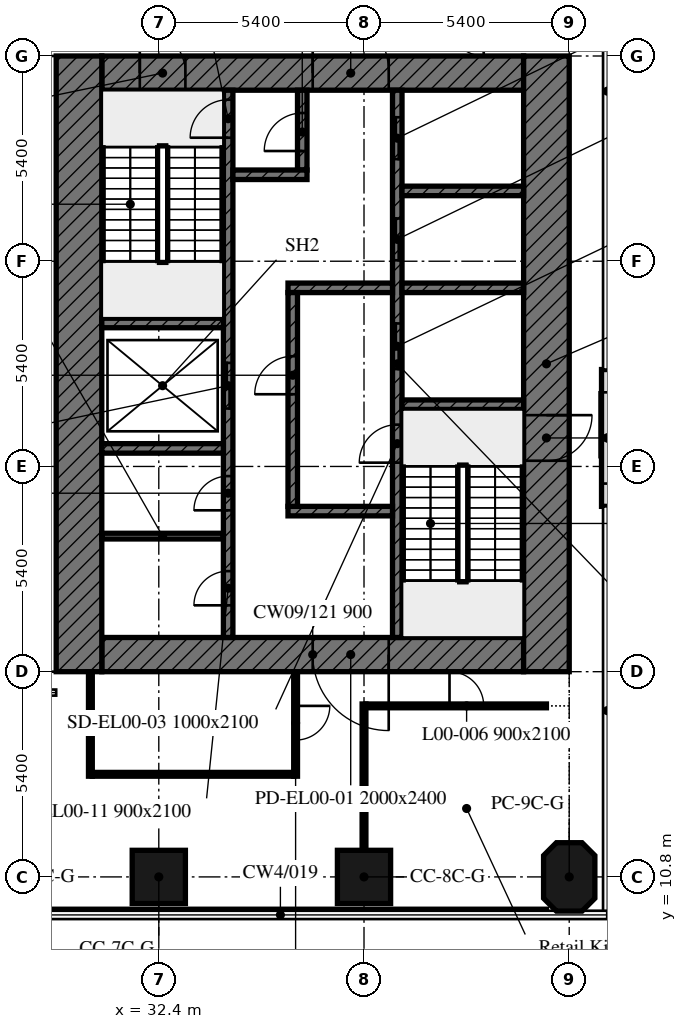
"""IFC4 building model, lengths in metres.
Left out: names, types, materials, properties, quantities, classifications, styles, units other than length and angle.
Written with IfcOpenShell. Run it as: python <this file> out.ifc"""

import sys

from ifc_helpers import new_model, si_unit, direction, frame, frame_2d, origin, origin_2d, place, context, subcontext, project, spatial, polyline, rectangle, outline, extrude, element, fill, save


model = new_model("IFC4")
c1 = context("Model", 3, precision=1e-05, world=origin(), true_north=direction((0.0, 1.0)))
c2 = subcontext(c1, "Body", "Model", "MODEL_VIEW")
j1 = project(units=[si_unit("LENGTHUNIT", "METRE"), si_unit("PLANEANGLEUNIT", "RADIAN")], contexts=[c1])
p1 = place(None, origin())
s1 = spatial("IfcSite", under=j1, at=p1, CompositionType="ELEMENT")
p2 = place(p1, origin())
s2 = spatial("IfcBuilding", under=s1, at=p2, CompositionType="ELEMENT")
p3 = place(p2, origin())
s3 = spatial("IfcBuildingStorey", under=s2, at=p3, CompositionType="ELEMENT", Elevation=0.0)
for number, where, z_axis, x_axis in (
    (1, (32.4, 10.8, 0.0), (0.0, 0.0, 1.0), (1.0, 0.0, 0.0)),
    (2, (37.8, 10.8, 0.0), (0.0, 0.0, 1.0), (1.0, 0.0, 0.0)),
):
    element("IfcColumn", number, at=place(p3, frame(where, z_axis=z_axis, x_axis=x_axis)), inside=s3, PredefinedType="COLUMN", context=c2, shape_type="SweptSolid", body=[
        extrude(rectangle(XDim=1.4, YDim=1.4, at=origin_2d()), origin(), (0.0, 0.0, 1.0), 8.0),
    ])
p4 = place(p3, frame((43.2, 10.8, 0.0), z_axis=(0.0, 0.0, 1.0), x_axis=(0.0, 1.0, 0.0)))
e3 = element("IfcColumn", 3, at=p4, inside=s3, PredefinedType="COLUMN", context=c2, shape_type="SweptSolid", body=[
    extrude(outline(polyline([(-0.562, -0.675), (0.562, -0.675), (0.9, -0.337), (0.9, 0.337), (0.562, 0.675), (-0.562, 0.675), (-0.9, 0.337), (-0.9, -0.337), (-0.562, -0.675)])), origin(), (0.0, 0.0, 1.0), 8.0),
])
p5 = place(p3, frame((44.2, 24.15, 0.0), z_axis=(0.0, 0.0, 1.0), x_axis=(0.0, -1.0, 0.0)))
e4 = element("IfcWall", 4, at=p5, inside=s3, PredefinedType="SOLIDWALL", context=c2, shape_type="SweptSolid", body=[
    extrude(rectangle(XDim=3.6, YDim=0.3, at=frame_2d((1.8, 0.0))), origin(), (0.0, 0.0, 1.0), 8.0),
])
p6 = place(p5, frame((0.6, 0.0, 0.0)))
e5 = element("IfcOpeningElement", 5, at=p6, cuts=e4, PredefinedType="OPENING", context=c2, shape_type="SweptSolid", body=[
    extrude(rectangle(XDim=2.4, YDim=2.7, at=frame_2d((1.2, 1.35))), frame((0.0, 0.16, 0.0), z_axis=(0.0, -1.0, 0.0), x_axis=(1.0, 0.0, 0.0)), (0.0, 0.0, 1.0), 0.32),
])
p7 = place(p3, frame((42.0, 16.65, 0.0), z_axis=(0.0, 0.0, 1.0), x_axis=(-1.0, 0.0, 0.0)))
e6 = element("IfcWall", 6, at=p7, inside=s3, PredefinedType="SOLIDWALL", context=c2, shape_type="SweptSolid", body=[
    extrude(rectangle(XDim=11.1, YDim=0.9, at=frame_2d((5.55, 0.0))), origin(), (0.0, 0.0, 1.0), 8.0),
])
p8 = place(p7, frame((3.55, 0.0, 0.0)))
e7 = element("IfcOpeningElement", 7, at=p8, cuts=e6, PredefinedType="OPENING", context=c2, shape_type="SweptSolid", body=[
    extrude(rectangle(XDim=2.0, YDim=2.4, at=frame_2d((1.0, 1.2))), frame((0.0, 0.45, 0.0), z_axis=(0.0, -1.0, 0.0), x_axis=(1.0, 0.0, 0.0)), (0.0, 0.0, 1.0), 0.9),
])
p9 = place(p3, frame((30.9, 31.95, 0.0), z_axis=(0.0, 0.0, 1.0), x_axis=(1.0, 0.0, 0.0)))
e8 = element("IfcWall", 8, at=p9, inside=s3, PredefinedType="SOLIDWALL", context=c2, shape_type="SweptSolid", body=[
    extrude(rectangle(XDim=11.1, YDim=0.9, at=frame_2d((5.55, 0.0))), origin(), (0.0, 0.0, 1.0), 8.0),
])
p10 = place(p9, frame((5.55, 0.0, 0.0)))
e9 = element("IfcOpeningElement", 9, at=p10, cuts=e8, PredefinedType="OPENING", context=c2, shape_type="SweptSolid", body=[
    extrude(rectangle(XDim=2.0, YDim=2.4, at=frame_2d((1.0, 1.2))), frame((0.0, 0.45, 0.0), z_axis=(0.0, -1.0, 0.0), x_axis=(1.0, 0.0, 0.0)), (0.0, 0.0, 1.0), 0.9),
])
p11 = place(p9, frame((1.0, 0.0, 0.0)))
e10 = element("IfcOpeningElement", 10, at=p11, cuts=e8, PredefinedType="OPENING", context=c2, shape_type="SweptSolid", body=[
    extrude(rectangle(XDim=1.2, YDim=2.1, at=frame_2d((0.6, 1.05))), frame((0.0, 0.45, 0.0), z_axis=(0.0, -1.0, 0.0), x_axis=(1.0, 0.0, 0.0)), (0.0, 0.0, 1.0), 0.9),
])
p12 = place(p3, frame((42.6, 32.4, 0.0), z_axis=(0.0, 0.0, 1.0), x_axis=(0.0, -1.0, 0.0)))
e11 = element("IfcWall", 11, at=p12, inside=s3, PredefinedType="SOLIDWALL", context=c2, shape_type="SweptSolid", body=[
    extrude(rectangle(XDim=16.2, YDim=1.2, at=frame_2d((8.1, 0.0))), origin(), (0.0, 0.0, 1.0), 8.0),
])
p13 = place(p12, frame((9.45, 0.0, 0.0)))
e12 = element("IfcOpeningElement", 12, at=p13, cuts=e11, PredefinedType="OPENING", context=c2, shape_type="SweptSolid", body=[
    extrude(rectangle(XDim=1.2, YDim=2.1, at=frame_2d((0.6, 1.05))), frame((0.0, 0.6, 0.0), z_axis=(0.0, -1.0, 0.0), x_axis=(1.0, 0.0, 0.0)), (0.0, 0.0, 1.0), 1.2),
])
p14 = place(p3, frame((30.3, 16.2, 0.0), z_axis=(0.0, 0.0, 1.0), x_axis=(0.0, 1.0, 0.0)))
e13 = element("IfcWall", 13, at=p14, inside=s3, PredefinedType="SOLIDWALL", context=c2, shape_type="SweptSolid", body=[
    extrude(rectangle(XDim=16.2, YDim=1.2, at=frame_2d((8.1, 0.0))), origin(), (0.0, 0.0, 1.0), 8.0),
])
p15 = place(p3, frame((38.675, 17.1, 0.0), z_axis=(0.0, 0.0, 1.0), x_axis=(0.0, 1.0, 0.0)))
e14 = element("IfcWall", 14, at=p15, inside=s3, PredefinedType="SOLIDWALL", context=c2, shape_type="SweptSolid", body=[
    extrude(rectangle(XDim=14.4, YDim=0.25, at=frame_2d((7.2, 0.0))), origin(), (0.0, 0.0, 1.0), 8.0),
])
p16 = place(p15, frame((4.6, 0.0, 0.0)))
e15 = element("IfcOpeningElement", 15, at=p16, cuts=e14, PredefinedType="OPENING", context=c2, shape_type="SweptSolid", body=[
    extrude(rectangle(XDim=1.0, YDim=2.1, at=frame_2d((0.5, 1.05))), frame((0.0, 0.125, 0.0), z_axis=(0.0, -1.0, 0.0), x_axis=(1.0, 0.0, 0.0)), (0.0, 0.0, 1.0), 0.25),
])
p17 = place(p15, frame((7.062, 0.0, 0.0)))
e16 = element("IfcOpeningElement", 16, at=p17, cuts=e14, PredefinedType="OPENING", context=c2, shape_type="SweptSolid", body=[
    extrude(rectangle(XDim=1.2, YDim=2.1, at=frame_2d((0.6, 1.05))), frame((0.0, 0.125, 0.0), z_axis=(0.0, -1.0, 0.0), x_axis=(1.0, 0.0, 0.0)), (0.0, 0.0, 1.0), 0.25),
])
p18 = place(p15, frame((9.925, 0.0, 0.0)))
e17 = element("IfcOpeningElement", 17, at=p18, cuts=e14, PredefinedType="OPENING", context=c2, shape_type="SweptSolid", body=[
    extrude(rectangle(XDim=1.1, YDim=2.1, at=frame_2d((0.55, 1.05))), frame((0.0, 0.125, 0.0), z_axis=(0.0, -1.0, 0.0), x_axis=(1.0, 0.0, 0.0)), (0.0, 0.0, 1.0), 0.25),
])
p19 = place(p15, frame((12.587, 0.0, 0.0)))
e18 = element("IfcOpeningElement", 18, at=p19, cuts=e14, PredefinedType="OPENING", context=c2, shape_type="SweptSolid", body=[
    extrude(rectangle(XDim=1.1, YDim=2.1, at=frame_2d((0.55, 1.05))), frame((0.0, 0.125, 0.0), z_axis=(0.0, -1.0, 0.0), x_axis=(1.0, 0.0, 0.0)), (0.0, 0.0, 1.0), 0.25),
])
p20 = place(p3, frame((34.225, 17.1, 0.0), z_axis=(0.0, 0.0, 1.0), x_axis=(0.0, 1.0, 0.0)))
e19 = element("IfcWall", 19, at=p20, inside=s3, PredefinedType="SOLIDWALL", context=c2, shape_type="SweptSolid", body=[
    extrude(rectangle(XDim=14.4, YDim=0.25, at=frame_2d((7.2, 0.0))), origin(), (0.0, 0.0, 1.0), 8.0),
])
p21 = place(p20, frame((13.15, 0.0, 0.0)))
e20 = element("IfcOpeningElement", 20, at=p21, cuts=e19, PredefinedType="OPENING", context=c2, shape_type="SweptSolid", body=[
    extrude(rectangle(XDim=1.0, YDim=2.1, at=frame_2d((0.5, 1.05))), frame((0.0, 0.125, 0.0), z_axis=(0.0, -1.0, 0.0), x_axis=(1.0, 0.0, 0.0)), (0.0, 0.0, 1.0), 0.25),
])
p22 = place(p20, frame((6.025, 0.0, 0.0)))
e21 = element("IfcOpeningElement", 21, at=p22, cuts=e19, PredefinedType="OPENING", context=c2, shape_type="SweptSolid", body=[
    extrude(rectangle(XDim=1.2, YDim=2.1, at=frame_2d((0.6, 1.05))), frame((0.0, 0.125, 0.0), z_axis=(0.0, -1.0, 0.0), x_axis=(1.0, 0.0, 0.0)), (0.0, 0.0, 1.0), 0.25),
])
p23 = place(p20, frame((0.846, 0.0, 0.0)))
e22 = element("IfcOpeningElement", 22, at=p23, cuts=e19, PredefinedType="OPENING", context=c2, shape_type="SweptSolid", body=[
    extrude(rectangle(XDim=0.9, YDim=2.1, at=frame_2d((0.45, 1.05))), frame((0.0, 0.125, 0.0), z_axis=(0.0, -1.0, 0.0), x_axis=(1.0, 0.0, 0.0)), (0.0, 0.0, 1.0), 0.25),
])
p24 = place(p20, frame((3.346, 0.0, 0.0)))
e23 = element("IfcOpeningElement", 23, at=p24, cuts=e19, PredefinedType="OPENING", context=c2, shape_type="SweptSolid", body=[
    extrude(rectangle(XDim=0.9, YDim=2.1, at=frame_2d((0.45, 1.05))), frame((0.0, 0.125, 0.0), z_axis=(0.0, -1.0, 0.0), x_axis=(1.0, 0.0, 0.0)), (0.0, 0.0, 1.0), 0.25),
])
p25 = place(p3, frame((38.8, 23.225, 0.0), z_axis=(0.0, 0.0, 1.0), x_axis=(1.0, 0.0, 0.0)))
e24 = element("IfcWall", 24, at=p25, inside=s3, PredefinedType="SOLIDWALL", context=c2, shape_type="SweptSolid", body=[
    extrude(rectangle(XDim=3.2, YDim=0.25, at=frame_2d((1.6, 0.0))), origin(), (0.0, 0.0, 1.0), 8.0),
])
for number, where, z_axis, x_axis in (
    (25, (30.9, 25.375, 0.0), (0.0, 0.0, 1.0), (1.0, 0.0, 0.0)),
    (26, (30.9, 22.075, 0.0), (0.0, 0.0, 1.0), (1.0, 0.0, 0.0)),
):
    element("IfcWall", number, at=place(p3, frame(where, z_axis=z_axis, x_axis=x_axis)), inside=s3, PredefinedType="SOLIDWALL", context=c2, shape_type="SweptSolid", body=[
        extrude(rectangle(XDim=3.2, YDim=0.25, at=frame_2d((1.6, 0.0))), origin(), (0.0, 0.0, 1.0), 8.0),
    ])
p26 = place(p3, frame((38.8, 26.3, 0.0), z_axis=(0.0, 0.0, 1.0), x_axis=(1.0, 0.0, 0.0)))
e27 = element("IfcWall", 27, at=p26, inside=s3, PredefinedType="SOLIDWALL", context=c2, shape_type="SweptSolid", body=[
    extrude(rectangle(XDim=3.2, YDim=0.25, at=frame_2d((1.6, 0.0))), origin(), (0.0, 0.0, 1.0), 8.0),
])
for number, where, z_axis, x_axis in (
    (28, (35.8, 26.3, 0.0), (0.0, 0.0, 1.0), (1.0, 0.0, 0.0)),
    (29, (35.8, 20.425, 0.0), (0.0, 0.0, 1.0), (1.0, 0.0, 0.0)),
):
    element("IfcWall", number, at=place(p3, frame(where, z_axis=z_axis, x_axis=x_axis)), inside=s3, PredefinedType="SOLIDWALL", context=c2, shape_type="SweptSolid", body=[
        extrude(rectangle(XDim=2.75, YDim=0.25, at=frame_2d((1.375, 0.0))), origin(), (0.0, 0.0, 1.0), 8.0),
    ])
p27 = place(p3, frame((36.175, 29.4, 0.0), z_axis=(0.0, 0.0, 1.0), x_axis=(0.0, 1.0, 0.0)))
e30 = element("IfcWall", 30, at=p27, inside=s3, PredefinedType="SOLIDWALL", context=c2, shape_type="SweptSolid", body=[
    extrude(rectangle(XDim=2.1, YDim=0.25, at=frame_2d((1.05, 0.0))), origin(), (0.0, 0.0, 1.0), 8.0),
])
p28 = place(p27, frame((0.5, 0.0, 0.0)))
e31 = element("IfcOpeningElement", 31, at=p28, cuts=e30, PredefinedType="OPENING", context=c2, shape_type="SweptSolid", body=[
    extrude(rectangle(XDim=1.0, YDim=2.1, at=frame_2d((0.5, 1.05))), frame((0.0, 0.125, 0.0), z_axis=(0.0, -1.0, 0.0), x_axis=(1.0, 0.0, 0.0)), (0.0, 0.0, 1.0), 0.25),
])
p29 = place(p3, frame((34.35, 29.275, 0.0), z_axis=(0.0, 0.0, 1.0), x_axis=(1.0, 0.0, 0.0)))
e32 = element("IfcWall", 32, at=p29, inside=s3, PredefinedType="SOLIDWALL", context=c2, shape_type="SweptSolid", body=[
    extrude(rectangle(XDim=1.95, YDim=0.25, at=frame_2d((0.975, 0.0))), origin(), (0.0, 0.0, 1.0), 8.0),
])
p30 = place(p3, frame((35.925, 20.55, 0.0), z_axis=(0.0, 0.0, 1.0), x_axis=(0.0, 1.0, 0.0)))
e33 = element("IfcWall", 33, at=p30, inside=s3, PredefinedType="SOLIDWALL", context=c2, shape_type="SweptSolid", body=[
    extrude(rectangle(XDim=5.625, YDim=0.25, at=frame_2d((2.812, 0.0))), origin(), (0.0, 0.0, 1.0), 8.0),
])
p31 = place(p30, frame((2.95, 0.0, 0.0)))
e34 = element("IfcOpeningElement", 34, at=p31, cuts=e33, PredefinedType="OPENING", context=c2, shape_type="SweptSolid", body=[
    extrude(rectangle(XDim=1.0, YDim=2.1, at=frame_2d((0.5, 1.05))), frame((0.0, 0.125, 0.0), z_axis=(0.0, -1.0, 0.0), x_axis=(1.0, 0.0, 0.0)), (0.0, 0.0, 1.0), 0.25),
])
p32 = place(p3, frame((38.8, 28.85, 0.0), z_axis=(0.0, 0.0, 1.0), x_axis=(1.0, 0.0, 0.0)))
e35 = element("IfcWall", 35, at=p32, inside=s3, PredefinedType="SOLIDWALL", context=c2, shape_type="SweptSolid", body=[
    extrude(rectangle(XDim=3.2, YDim=0.25, at=frame_2d((1.6, 0.0))), origin(), (0.0, 0.0, 1.0), 8.0),
])
p33 = place(p3, frame((30.9, 19.767, 0.0), z_axis=(0.0, 0.0, 1.0), x_axis=(1.0, 0.0, 0.0)))
e36 = element("IfcWall", 36, at=p33, inside=s3, PredefinedType="PARTITIONING", context=c2, shape_type="SweptSolid", body=[
    extrude(rectangle(XDim=3.2, YDim=0.15, at=frame_2d((1.6, 0.0))), origin(), (0.0, 0.0, 1.0), 8.0),
])
p34 = place(p3, frame((30.6, 13.45, 0.0), z_axis=(0.0, 0.0, 1.0), x_axis=(0.0, 1.0, 0.0)))
e37 = element("IfcWall", 37, at=p34, inside=s3, PredefinedType="PARTITIONING", context=c2, shape_type="SweptSolid", body=[
    extrude(rectangle(XDim=2.75, YDim=0.1, at=frame_2d((1.375, 0.0))), origin(), (0.0, 0.0, 1.0), 8.0),
])
p35 = place(p3, frame((37.8, 11.601, 0.0), z_axis=(0.0, 0.0, 1.0), x_axis=(0.0, 1.0, 0.0)))
e38 = element("IfcWall", 38, at=p35, inside=s3, PredefinedType="PARTITIONING", context=c2, shape_type="SweptSolid", body=[
    extrude(rectangle(XDim=3.75, YDim=0.1, at=frame_2d((1.875, 0.0))), origin(), (0.0, 0.0, 1.0), 8.0),
])
p36 = place(p3, frame((37.85, 15.3, 0.0), z_axis=(0.0, 0.0, 1.0), x_axis=(1.0, 0.0, 0.0)))
e39 = element("IfcWall", 39, at=p36, inside=s3, PredefinedType="PARTITIONING", context=c2, shape_type="SweptSolid", body=[
    extrude(rectangle(XDim=4.75, YDim=0.1, at=frame_2d((2.375, 0.0))), origin(), (0.0, 0.0, 1.0), 8.0),
])
p37 = place(p36, frame((2.2, 0.0, 0.0)))
e40 = element("IfcOpeningElement", 40, at=p37, cuts=e39, PredefinedType="OPENING", context=c2, shape_type="SweptSolid", body=[
    extrude(rectangle(XDim=0.9, YDim=2.1, at=frame_2d((0.45, 1.05))), frame((0.0, 0.05, 0.0), z_axis=(0.0, -1.0, 0.0), x_axis=(1.0, 0.0, 0.0)), (0.0, 0.0, 1.0), 0.1),
])
p38 = place(p3, frame((36.0, 16.2, 0.0), z_axis=(0.0, 0.0, 1.0), x_axis=(0.0, -1.0, 0.0)))
e41 = element("IfcWall", 41, at=p38, inside=s3, PredefinedType="PARTITIONING", context=c2, shape_type="SweptSolid", body=[
    extrude(rectangle(XDim=2.75, YDim=0.1, at=frame_2d((1.375, 0.0))), origin(), (0.0, 0.0, 1.0), 8.0),
])
p39 = place(p38, frame((0.9, 0.0, 0.0)))
e42 = element("IfcOpeningElement", 42, at=p39, cuts=e41, PredefinedType="OPENING", context=c2, shape_type="SweptSolid", body=[
    extrude(rectangle(XDim=0.9, YDim=2.1, at=frame_2d((0.45, 1.05))), frame((0.0, 0.05, 0.0), z_axis=(0.0, -1.0, 0.0), x_axis=(1.0, 0.0, 0.0)), (0.0, 0.0, 1.0), 0.1),
])
p40 = place(p3, frame((35.95, 13.5, 0.0), z_axis=(0.0, 0.0, 1.0), x_axis=(-1.0, 0.0, 0.0)))
e43 = element("IfcWall", 43, at=p40, inside=s3, PredefinedType="PARTITIONING", context=c2, shape_type="SweptSolid", body=[
    extrude(rectangle(XDim=5.3, YDim=0.1, at=frame_2d((2.65, 0.0))), origin(), (0.0, 0.0, 1.0), 7.25),
])
p41 = place(p3, frame((27.0, 9.9, 0.0), z_axis=(0.0, 0.0, 1.0), x_axis=(1.0, 0.0, 0.0)))
e44 = element("IfcWall", 44, at=p41, inside=s3, PredefinedType="PARTITIONING", context=c2, shape_type="SweptSolid", body=[
    extrude(rectangle(XDim=15.6, YDim=0.1, at=frame_2d((7.8, 0.0))), origin(), (0.0, 0.0, 1.0), 7.25),
])
p42 = place(p6, origin())
e45 = element("IfcDoor", 45, at=p42, inside=s3, OperationType="DOUBLE_DOOR_DOUBLE_SWING", PredefinedType="DOOR", context=c2, shape_type="SweptSolid", body=[
    extrude(rectangle(XDim=2.4, YDim=2.7, at=frame_2d((1.2, 1.35))), frame((0.0, 0.025, 0.0), z_axis=(0.0, -1.0, 0.0), x_axis=(1.0, 0.0, 0.0)), (0.0, 0.0, 1.0), 0.05),
])
fill(e5, e45)
p43 = place(p8, origin())
e46 = element("IfcDoor", 46, at=p43, inside=s3, OperationType="DOUBLE_DOOR_SINGLE_SWING", PredefinedType="DOOR", context=c2, shape_type="SweptSolid", body=[
    extrude(rectangle(XDim=2.0, YDim=2.4, at=frame_2d((1.0, 1.2))), frame((0.0, 0.025, 0.0), z_axis=(0.0, -1.0, 0.0), x_axis=(1.0, 0.0, 0.0)), (0.0, 0.0, 1.0), 0.05),
])
fill(e7, e46)
p44 = place(p10, origin())
e47 = element("IfcDoor", 47, at=p44, inside=s3, OperationType="DOUBLE_DOOR_SINGLE_SWING", PredefinedType="DOOR", context=c2, shape_type="SweptSolid", body=[
    extrude(rectangle(XDim=2.0, YDim=2.4, at=frame_2d((1.0, 1.2))), frame((0.0, 0.025, 0.0), z_axis=(0.0, -1.0, 0.0), x_axis=(1.0, 0.0, 0.0)), (0.0, 0.0, 1.0), 0.05),
])
fill(e9, e47)
p45 = place(p16, origin())
e48 = element("IfcDoor", 48, at=p45, inside=s3, OperationType="SINGLE_SWING_LEFT", PredefinedType="DOOR", context=c2, shape_type="SweptSolid", body=[
    extrude(rectangle(XDim=1.0, YDim=2.1, at=frame_2d((0.5, 1.05))), frame((0.0, 0.025, 0.0), z_axis=(0.0, -1.0, 0.0), x_axis=(1.0, 0.0, 0.0)), (0.0, 0.0, 1.0), 0.05),
])
fill(e15, e48)
p46 = place(p31, origin())
e49 = element("IfcDoor", 49, at=p46, inside=s3, OperationType="SINGLE_SWING_LEFT", PredefinedType="DOOR", context=c2, shape_type="SweptSolid", body=[
    extrude(rectangle(XDim=1.0, YDim=2.1, at=frame_2d((0.5, 1.05))), frame((0.0, 0.025, 0.0), z_axis=(0.0, -1.0, 0.0), x_axis=(1.0, 0.0, 0.0)), (0.0, 0.0, 1.0), 0.05),
])
fill(e34, e49)
p47 = place(p21, origin())
e50 = element("IfcDoor", 50, at=p47, inside=s3, OperationType="SINGLE_SWING_LEFT", PredefinedType="DOOR", context=c2, shape_type="SweptSolid", body=[
    extrude(rectangle(XDim=1.0, YDim=2.1, at=frame_2d((0.5, 1.05))), frame((0.0, 0.025, 0.0), z_axis=(0.0, -1.0, 0.0), x_axis=(1.0, 0.0, 0.0)), (0.0, 0.0, 1.0), 0.05),
])
fill(e20, e50)
p48 = place(p28, origin())
e51 = element("IfcDoor", 51, at=p48, inside=s3, OperationType="SINGLE_SWING_LEFT", PredefinedType="DOOR", context=c2, shape_type="SweptSolid", body=[
    extrude(rectangle(XDim=1.0, YDim=2.1, at=frame_2d((0.5, 1.05))), frame((0.0, 0.025, 0.0), z_axis=(0.0, -1.0, 0.0), x_axis=(1.0, 0.0, 0.0)), (0.0, 0.0, 1.0), 0.05),
])
fill(e31, e51)
p49 = place(p17, origin())
e52 = element("IfcDoor", 52, at=p49, inside=s3, OperationType="DOUBLE_DOOR_SLIDING", PredefinedType="DOOR", context=c2, shape_type="SweptSolid", body=[
    extrude(rectangle(XDim=1.2, YDim=2.1, at=frame_2d((0.6, 1.05))), frame((0.0, 0.025, 0.0), z_axis=(0.0, -1.0, 0.0), x_axis=(1.0, 0.0, 0.0)), (0.0, 0.0, 1.0), 0.05),
])
fill(e16, e52)
p50 = place(p18, origin())
e53 = element("IfcDoor", 53, at=p50, inside=s3, OperationType="DOUBLE_DOOR_SLIDING", PredefinedType="DOOR", context=c2, shape_type="SweptSolid", body=[
    extrude(rectangle(XDim=1.1, YDim=2.1, at=frame_2d((0.55, 1.05))), frame((0.0, 0.025, 0.0), z_axis=(0.0, -1.0, 0.0), x_axis=(1.0, 0.0, 0.0)), (0.0, 0.0, 1.0), 0.05),
])
fill(e17, e53)
p51 = place(p19, origin())
e54 = element("IfcDoor", 54, at=p51, inside=s3, OperationType="DOUBLE_DOOR_SLIDING", PredefinedType="DOOR", context=c2, shape_type="SweptSolid", body=[
    extrude(rectangle(XDim=1.1, YDim=2.1, at=frame_2d((0.55, 1.05))), frame((0.0, 0.025, 0.0), z_axis=(0.0, -1.0, 0.0), x_axis=(1.0, 0.0, 0.0)), (0.0, 0.0, 1.0), 0.05),
])
fill(e18, e54)
p52 = place(p22, origin())
e55 = element("IfcDoor", 55, at=p52, inside=s3, OperationType="DOUBLE_DOOR_SLIDING", PredefinedType="DOOR", context=c2, shape_type="SweptSolid", body=[
    extrude(rectangle(XDim=1.2, YDim=2.1, at=frame_2d((0.6, 1.05))), frame((0.0, 0.025, 0.0), z_axis=(0.0, -1.0, 0.0), x_axis=(1.0, 0.0, 0.0)), (0.0, 0.0, 1.0), 0.05),
])
fill(e21, e55)
p53 = place(p23, origin())
e56 = element("IfcDoor", 56, at=p53, inside=s3, OperationType="SINGLE_SWING_LEFT", PredefinedType="DOOR", context=c2, shape_type="SweptSolid", body=[
    extrude(rectangle(XDim=0.9, YDim=2.1, at=frame_2d((0.45, 1.05))), frame((0.0, 0.025, 0.0), z_axis=(0.0, -1.0, 0.0), x_axis=(1.0, 0.0, 0.0)), (0.0, 0.0, 1.0), 0.05),
])
fill(e22, e56)
p54 = place(p24, origin())
e57 = element("IfcDoor", 57, at=p54, inside=s3, OperationType="SINGLE_SWING_LEFT", PredefinedType="DOOR", context=c2, shape_type="SweptSolid", body=[
    extrude(rectangle(XDim=0.9, YDim=2.1, at=frame_2d((0.45, 1.05))), frame((0.0, 0.025, 0.0), z_axis=(0.0, -1.0, 0.0), x_axis=(1.0, 0.0, 0.0)), (0.0, 0.0, 1.0), 0.05),
])
fill(e23, e57)
p55 = place(p13, origin())
e58 = element("IfcDoor", 58, at=p55, inside=s3, OperationType="DOUBLE_DOOR_SINGLE_SWING", PredefinedType="DOOR", context=c2, shape_type="SweptSolid", body=[
    extrude(rectangle(XDim=1.2, YDim=2.1, at=frame_2d((0.6, 1.05))), frame((0.0, 0.025, 0.0), z_axis=(0.0, -1.0, 0.0), x_axis=(1.0, 0.0, 0.0)), (0.0, 0.0, 1.0), 0.05),
])
fill(e12, e58)
p56 = place(p11, origin())
e59 = element("IfcDoor", 59, at=p56, inside=s3, OperationType="DOUBLE_DOOR_SINGLE_SWING", PredefinedType="DOOR", context=c2, shape_type="SweptSolid", body=[
    extrude(rectangle(XDim=1.2, YDim=2.1, at=frame_2d((0.6, 1.05))), frame((0.0, 0.025, 0.0), z_axis=(0.0, -1.0, 0.0), x_axis=(1.0, 0.0, 0.0)), (0.0, 0.0, 1.0), 0.05),
])
fill(e10, e59)
p57 = place(p37, origin())
e60 = element("IfcDoor", 60, at=p57, inside=s3, OperationType="SINGLE_SWING_RIGHT", PredefinedType="DOOR", context=c2, shape_type="SweptSolid", body=[
    extrude(rectangle(XDim=0.9, YDim=2.1, at=frame_2d((0.45, 1.05))), frame((0.0, 0.025, 0.0), z_axis=(0.0, -1.0, 0.0), x_axis=(1.0, 0.0, 0.0)), (0.0, 0.0, 1.0), 0.05),
])
fill(e40, e60)
p58 = place(p39, origin())
e61 = element("IfcDoor", 61, at=p58, inside=s3, OperationType="SINGLE_SWING_LEFT", PredefinedType="DOOR", context=c2, shape_type="SweptSolid", body=[
    extrude(rectangle(XDim=0.9, YDim=2.1, at=frame_2d((0.45, 1.05))), frame((0.0, 0.025, 0.0), z_axis=(0.0, -1.0, 0.0), x_axis=(1.0, 0.0, 0.0)), (0.0, 0.0, 1.0), 0.05),
])
fill(e42, e61)
save(model, sys.argv[1])
